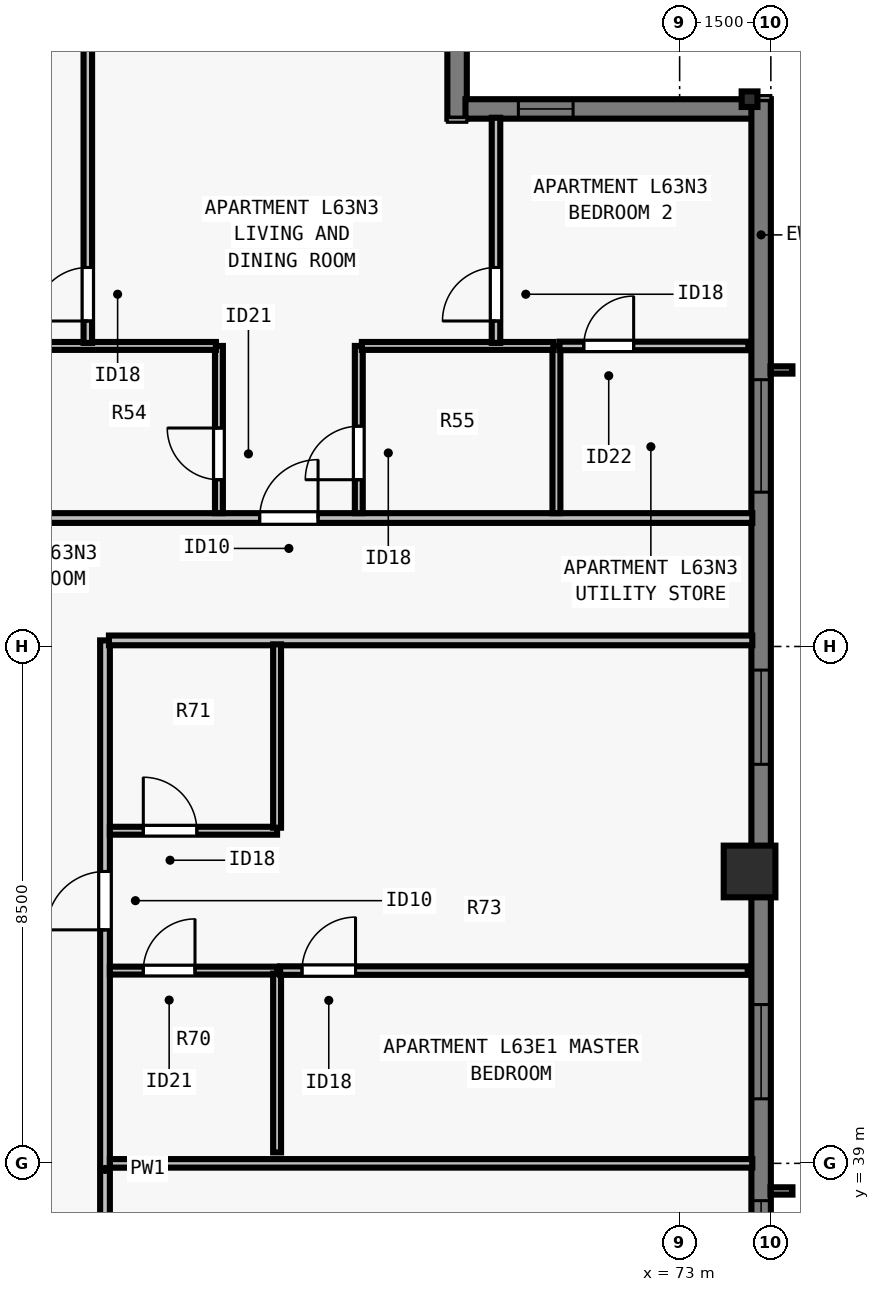
"""IFC4 building model, lengths in metres.
Left out: names, types, materials, properties, quantities, classifications, styles, units other than length and angle.
Written with IfcOpenShell. Run it as: python <this file> out.ifc"""

import sys

from ifc_helpers import new_model, si_unit, direction, frame, frame_2d, origin, origin_2d, place, context, subcontext, project, spatial, rectangle, i_section, extrude, element, fill, save


model = new_model("IFC4")
c1 = context("Model", 3, precision=1e-05, world=origin(), true_north=direction((0.0, 1.0)))
c2 = subcontext(c1, "Body", "Model", "MODEL_VIEW")
j1 = project(units=[si_unit("LENGTHUNIT", "METRE"), si_unit("PLANEANGLEUNIT", "RADIAN")], contexts=[c1])
p1 = place(None, origin())
s1 = spatial("IfcSite", under=j1, at=p1, CompositionType="ELEMENT")
p2 = place(p1, origin())
s2 = spatial("IfcBuilding", under=s1, at=p2, CompositionType="ELEMENT")
p3 = place(p2, frame((0.0, 0.0, 230.5)))
s3 = spatial("IfcBuildingStorey", under=s2, at=p3, CompositionType="ELEMENT", Elevation=230.5)
p4 = place(p3, frame((74.15, 43.8, 0.0), z_axis=(0.0, 0.0, 1.0), x_axis=(0.0, 1.0, 0.0)))
e1 = element("IfcColumn", 1, at=p4, inside=s3, PredefinedType="COLUMN", context=c2, shape_type="SweptSolid", body=[
    extrude(rectangle(XDim=0.85, YDim=0.85, at=origin_2d()), origin(), (0.0, 0.0, 1.0), 3.5),
])
p5 = place(p3, frame((74.15, 56.5, 0.0), z_axis=(0.0, 0.0, 1.0), x_axis=(0.0, 1.0, 0.0)))
e2 = element("IfcColumn", 2, at=p5, inside=s3, PredefinedType="COLUMN", context=c2, shape_type="SweptSolid", body=[
    extrude(i_section(OverallWidth=0.256, OverallDepth=0.26, WebThickness=0.01, FlangeThickness=0.017, FilletRadius=0.013, at=origin_2d()), origin(), (0.0, 0.0, 1.0), 3.5),
])
p6 = place(p3, frame((69.34, 61.5, 0.0), z_axis=(0.0, 0.0, 1.0), x_axis=(0.0, -1.0, 0.0)))
e3 = element("IfcWall", 3, at=p6, inside=s3, PredefinedType="SOLIDWALL", context=c2, shape_type="SweptSolid", body=[
    extrude(rectangle(XDim=5.32, YDim=0.32, at=frame_2d((2.66, 0.0))), origin(), (0.0, 0.0, 1.0), 3.29),
])
p7 = place(p3, frame((69.478, 56.34, 0.0), z_axis=(0.0, 0.0, 1.0), x_axis=(1.0, 0.0, 0.0)))
e4 = element("IfcWall", 4, at=p7, inside=s3, PredefinedType="SOLIDWALL", context=c2, shape_type="SweptSolid", body=[
    extrude(rectangle(XDim=4.724, YDim=0.32, at=frame_2d((2.362, 0.0))), origin(), (0.0, 0.0, 1.0), 3.29),
])
p8 = place(p7, frame((0.87, 0.0, 0.8)))
e5 = element("IfcOpeningElement", 5, at=p8, cuts=e4, PredefinedType="OPENING", context=c2, shape_type="SweptSolid", body=[
    extrude(rectangle(XDim=0.9, YDim=1.678, at=frame_2d((0.45, 0.839))), frame((0.0, 0.17, 0.0), z_axis=(0.0, -1.0, 0.0), x_axis=(1.0, 0.0, 0.0)), (0.0, 0.0, 1.0), 0.34),
])
p9 = place(p3, frame((74.34, 56.5, 0.0), z_axis=(0.0, 0.0, 1.0), x_axis=(0.0, -1.0, 0.0)))
e6 = element("IfcWall", 6, at=p9, inside=s3, PredefinedType="SOLIDWALL", context=c2, shape_type="SweptSolid", body=[
    extrude(rectangle(XDim=34.702, YDim=0.32, at=frame_2d((17.351, 0.0))), origin(), (0.0, 0.0, 1.0), 3.29),
])
p10 = place(p9, frame((4.613, 0.0, 0.8)))
e7 = element("IfcOpeningElement", 7, at=p10, cuts=e6, PredefinedType="OPENING", context=c2, shape_type="SweptSolid", body=[
    extrude(rectangle(XDim=1.85, YDim=1.678, at=frame_2d((0.925, 0.839))), frame((0.0, 0.17, 0.0), z_axis=(0.0, -1.0, 0.0), x_axis=(1.0, 0.0, 0.0)), (0.0, 0.0, 1.0), 0.34),
])
p11 = place(p9, frame((9.388, 0.0, 0.8)))
e8 = element("IfcOpeningElement", 8, at=p11, cuts=e6, PredefinedType="OPENING", context=c2, shape_type="SweptSolid", body=[
    extrude(rectangle(XDim=1.55, YDim=1.678, at=frame_2d((0.775, 0.839))), frame((0.0, 0.17, 0.0), z_axis=(0.0, -1.0, 0.0), x_axis=(1.0, 0.0, 0.0)), (0.0, 0.0, 1.0), 0.34),
])
p12 = place(p9, frame((14.888, 0.0, 0.8)))
e9 = element("IfcOpeningElement", 9, at=p12, cuts=e6, PredefinedType="OPENING", context=c2, shape_type="SweptSolid", body=[
    extrude(rectangle(XDim=1.55, YDim=1.678, at=frame_2d((0.775, 0.839))), frame((0.0, 0.17, 0.0), z_axis=(0.0, -1.0, 0.0), x_axis=(1.0, 0.0, 0.0)), (0.0, 0.0, 1.0), 0.34),
])
p13 = place(p9, frame((18.114, 0.0, 0.8)))
e10 = element("IfcOpeningElement", 10, at=p13, cuts=e6, PredefinedType="OPENING", context=c2, shape_type="SweptSolid", body=[
    extrude(rectangle(XDim=1.85, YDim=1.678, at=frame_2d((0.925, 0.839))), frame((0.0, 0.17, 0.0), z_axis=(0.0, -1.0, 0.0), x_axis=(1.0, 0.0, 0.0)), (0.0, 0.0, 1.0), 0.34),
])
p14 = place(p9, frame((23.614, 0.0, 0.8)))
e11 = element("IfcOpeningElement", 11, at=p14, cuts=e6, PredefinedType="OPENING", context=c2, shape_type="SweptSolid", body=[
    extrude(rectangle(XDim=1.85, YDim=1.678, at=frame_2d((0.925, 0.839))), frame((0.0, 0.17, 0.0), z_axis=(0.0, -1.0, 0.0), x_axis=(1.0, 0.0, 0.0)), (0.0, 0.0, 1.0), 0.34),
])
p15 = place(p9, frame((28.839, 0.0, 0.8)))
e12 = element("IfcOpeningElement", 12, at=p15, cuts=e6, PredefinedType="OPENING", context=c2, shape_type="SweptSolid", body=[
    extrude(rectangle(XDim=1.55, YDim=1.678, at=frame_2d((0.775, 0.839))), frame((0.0, 0.17, 0.0), z_axis=(0.0, -1.0, 0.0), x_axis=(1.0, 0.0, 0.0)), (0.0, 0.0, 1.0), 0.34),
])
p16 = place(p9, frame((31.35, 0.0, 0.8)))
e13 = element("IfcOpeningElement", 13, at=p16, cuts=e6, PredefinedType="OPENING", context=c2, shape_type="SweptSolid", body=[
    extrude(rectangle(XDim=0.9, YDim=1.678, at=frame_2d((0.45, 0.839))), frame((0.0, 0.17, 0.0), z_axis=(0.0, -1.0, 0.0), x_axis=(1.0, 0.0, 0.0)), (0.0, 0.0, 1.0), 0.34),
])
p17 = place(p3, frame((29.77, 49.613, 0.0), z_axis=(0.0, 0.0, 1.0), x_axis=(1.0, 0.0, 0.0)))
e14 = element("IfcWall", 14, at=p17, inside=s3, PredefinedType="PARTITIONING", context=c2, shape_type="SweptSolid", body=[
    extrude(rectangle(XDim=44.425, YDim=0.16, at=frame_2d((22.212, 0.0))), origin(), (0.0, 0.0, 1.0), 2.958),
])
p18 = place(p17, frame((7.241, 0.0, 0.0)))
e15 = element("IfcOpeningElement", 15, at=p18, cuts=e14, PredefinedType="OPENING", context=c2, shape_type="SweptSolid", body=[
    extrude(rectangle(XDim=0.96, YDim=2.18, at=frame_2d((0.48, 1.09))), frame((0.0, 0.09, 0.0), z_axis=(0.0, -1.0, 0.0), x_axis=(1.0, 0.0, 0.0)), (0.0, 0.0, 1.0), 0.18),
])
p19 = place(p17, frame((21.815, 0.0, 0.0)))
e16 = element("IfcOpeningElement", 16, at=p19, cuts=e14, PredefinedType="OPENING", context=c2, shape_type="SweptSolid", body=[
    extrude(rectangle(XDim=0.96, YDim=2.18, at=frame_2d((0.48, 1.09))), frame((0.0, 0.09, 0.0), z_axis=(0.0, -1.0, 0.0), x_axis=(1.0, 0.0, 0.0)), (0.0, 0.0, 1.0), 0.18),
])
p20 = place(p17, frame((36.324, 0.0, 0.0)))
e17 = element("IfcOpeningElement", 17, at=p20, cuts=e14, PredefinedType="OPENING", context=c2, shape_type="SweptSolid", body=[
    extrude(rectangle(XDim=0.96, YDim=2.18, at=frame_2d((0.48, 1.09))), frame((0.0, 0.09, 0.0), z_axis=(0.0, -1.0, 0.0), x_axis=(1.0, 0.0, 0.0)), (0.0, 0.0, 1.0), 0.18),
])
p21 = place(p3, frame((63.55, 30.4, 0.0), z_axis=(0.0, 0.0, 1.0), x_axis=(0.0, 1.0, 0.0)))
e18 = element("IfcWall", 18, at=p21, inside=s3, PredefinedType="PARTITIONING", context=c2, shape_type="SweptSolid", body=[
    extrude(rectangle(XDim=17.2, YDim=0.16, at=frame_2d((8.6, 0.0))), origin(), (0.0, 0.0, 1.0), 3.29),
])
p22 = place(p21, frame((3.6, 0.0, 0.0)))
e19 = element("IfcOpeningElement", 19, at=p22, cuts=e18, PredefinedType="OPENING", context=c2, shape_type="SweptSolid", body=[
    extrude(rectangle(XDim=0.96, YDim=2.12, at=frame_2d((0.48, 1.06))), frame((0.0, 0.09, 0.0), z_axis=(0.0, -1.0, 0.0), x_axis=(1.0, 0.0, 0.0)), (0.0, 0.0, 1.0), 0.18),
])
p23 = place(p21, frame((12.44, 0.0, 0.0)))
e20 = element("IfcOpeningElement", 20, at=p23, cuts=e18, PredefinedType="OPENING", context=c2, shape_type="SweptSolid", body=[
    extrude(rectangle(XDim=0.96, YDim=2.18, at=frame_2d((0.48, 1.09))), frame((0.0, 0.09, 0.0), z_axis=(0.0, -1.0, 0.0), x_axis=(1.0, 0.0, 0.0)), (0.0, 0.0, 1.0), 0.18),
])
p24 = place(p3, frame((63.615, 47.6, 0.0), z_axis=(0.0, 0.0, 1.0), x_axis=(1.0, 0.0, 0.0)))
e21 = element("IfcWall", 21, at=p24, inside=s3, PredefinedType="PARTITIONING", context=c2, shape_type="SweptSolid", body=[
    extrude(rectangle(XDim=10.58, YDim=0.16, at=frame_2d((5.29, 0.0))), origin(), (0.0, 0.0, 1.0), 3.29),
])
p25 = place(p3, frame((65.424, 49.692, 0.0), z_axis=(0.0, 0.0, 1.0), x_axis=(0.0, 1.0, 0.0)))
e22 = element("IfcWall", 22, at=p25, inside=s3, PredefinedType="PLUMBINGWALL", context=c2, shape_type="SweptSolid", body=[
    extrude(rectangle(XDim=2.75, YDim=0.13, at=frame_2d((1.375, 0.0))), origin(), (0.0, 0.0, 1.0), 3.29),
])
p26 = place(p25, frame((0.55, 0.0, 0.0)))
e23 = element("IfcOpeningElement", 23, at=p26, cuts=e22, PredefinedType="OPENING", context=c2, shape_type="SweptSolid", body=[
    extrude(rectangle(XDim=0.85, YDim=2.08, at=frame_2d((0.425, 1.04))), frame((0.0, 0.075, 0.0), z_axis=(0.0, -1.0, 0.0), x_axis=(1.0, 0.0, 0.0)), (0.0, 0.0, 1.0), 0.15),
])
p27 = place(p3, frame((62.524, 52.442, 0.0), z_axis=(0.0, 0.0, 1.0), x_axis=(1.0, 0.0, 0.0)))
e24 = element("IfcWall", 24, at=p27, inside=s3, PredefinedType="PLUMBINGWALL", context=c2, shape_type="SweptSolid", body=[
    extrude(rectangle(XDim=2.85, YDim=0.13, at=frame_2d((1.425, 0.0))), origin(), (0.0, 0.0, 1.0), 3.29),
])
p28 = place(p3, frame((70.974, 49.692, 0.0), z_axis=(0.0, 0.0, 1.0), x_axis=(0.0, 1.0, 0.0)))
e25 = element("IfcWall", 25, at=p28, inside=s3, PredefinedType="PLUMBINGWALL", context=c2, shape_type="SweptSolid", body=[
    extrude(rectangle(XDim=2.75, YDim=0.13, at=frame_2d((1.375, 0.0))), origin(), (0.0, 0.0, 1.0), 3.29),
])
p29 = place(p3, frame((67.724, 49.692, 0.0), z_axis=(0.0, 0.0, 1.0), x_axis=(0.0, 1.0, 0.0)))
e26 = element("IfcWall", 26, at=p29, inside=s3, PredefinedType="PLUMBINGWALL", context=c2, shape_type="SweptSolid", body=[
    extrude(rectangle(XDim=2.75, YDim=0.13, at=frame_2d((1.375, 0.0))), origin(), (0.0, 0.0, 1.0), 3.29),
])
p30 = place(p29, frame((0.55, 0.0, 0.0)))
e27 = element("IfcOpeningElement", 27, at=p30, cuts=e26, PredefinedType="OPENING", context=c2, shape_type="SweptSolid", body=[
    extrude(rectangle(XDim=0.88, YDim=2.1, at=frame_2d((0.44, 1.05))), frame((0.0, 0.075, 0.0), z_axis=(0.0, -1.0, 0.0), x_axis=(1.0, 0.0, 0.0)), (0.0, 0.0, 1.0), 0.15),
])
p31 = place(p3, frame((67.774, 52.442, 0.0), z_axis=(0.0, 0.0, 1.0), x_axis=(1.0, 0.0, 0.0)))
e28 = element("IfcWall", 28, at=p31, inside=s3, PredefinedType="PLUMBINGWALL", context=c2, shape_type="SweptSolid", body=[
    extrude(rectangle(XDim=3.15, YDim=0.13, at=frame_2d((1.575, 0.0))), origin(), (0.0, 0.0, 1.0), 2.958),
])
p32 = place(p3, frame((63.268, 52.492, 0.0), z_axis=(0.0, 0.0, 1.0), x_axis=(0.0, 1.0, 0.0)))
e29 = element("IfcWall", 29, at=p32, inside=s3, PredefinedType="PARTITIONING", context=c2, shape_type="SweptSolid", body=[
    extrude(rectangle(XDim=8.628, YDim=0.14, at=frame_2d((4.314, 0.0))), origin(), (0.0, 0.0, 1.0), 3.29),
])
p33 = place(p32, frame((0.36, 0.0, 0.0)))
e30 = element("IfcOpeningElement", 30, at=p33, cuts=e29, PredefinedType="OPENING", context=c2, shape_type="SweptSolid", body=[
    extrude(rectangle(XDim=0.88, YDim=2.1, at=frame_2d((0.44, 1.05))), frame((0.0, 0.08, 0.0), z_axis=(0.0, -1.0, 0.0), x_axis=(1.0, 0.0, 0.0)), (0.0, 0.0, 1.0), 0.16),
])
p34 = place(p3, frame((69.98, 52.492, 0.0), z_axis=(0.0, 0.0, 1.0), x_axis=(0.0, 1.0, 0.0)))
e31 = element("IfcWall", 31, at=p34, inside=s3, PredefinedType="PARTITIONING", context=c2, shape_type="SweptSolid", body=[
    extrude(rectangle(XDim=3.703, YDim=0.14, at=frame_2d((1.851, 0.0))), origin(), (0.0, 0.0, 1.0), 3.29),
])
p35 = place(p34, frame((0.36, 0.0, 0.0)))
e32 = element("IfcOpeningElement", 32, at=p35, cuts=e31, PredefinedType="OPENING", context=c2, shape_type="SweptSolid", body=[
    extrude(rectangle(XDim=0.88, YDim=2.1, at=frame_2d((0.44, 1.05))), frame((0.0, 0.08, 0.0), z_axis=(0.0, -1.0, 0.0), x_axis=(1.0, 0.0, 0.0)), (0.0, 0.0, 1.0), 0.16),
])
p36 = place(p3, frame((71.024, 52.442, 0.0), z_axis=(0.0, 0.0, 1.0), x_axis=(1.0, 0.0, 0.0)))
e33 = element("IfcWall", 33, at=p36, inside=s3, PredefinedType="PARTITIONING", context=c2, shape_type="SweptSolid", body=[
    extrude(rectangle(XDim=3.106, YDim=0.14, at=frame_2d((1.553, 0.0))), origin(), (0.0, 0.0, 1.0), 3.29),
])
p37 = place(p36, frame((0.4, 0.0, 0.0)))
e34 = element("IfcOpeningElement", 34, at=p37, cuts=e33, PredefinedType="OPENING", context=c2, shape_type="SweptSolid", body=[
    extrude(rectangle(XDim=0.82, YDim=2.1, at=frame_2d((0.41, 1.05))), frame((0.0, 0.08, 0.0), z_axis=(0.0, -1.0, 0.0), x_axis=(1.0, 0.0, 0.0)), (0.0, 0.0, 1.0), 0.16),
])
p38 = place(p3, frame((63.63, 39.0, 0.0), z_axis=(0.0, 0.0, 1.0), x_axis=(1.0, 0.0, 0.0)))
e35 = element("IfcWall", 35, at=p38, inside=s3, PredefinedType="PARTITIONING", context=c2, shape_type="SweptSolid", body=[
    extrude(rectangle(XDim=10.565, YDim=0.14, at=frame_2d((5.283, 0.0))), origin(), (0.0, 0.0, 1.0), 3.29),
])
p39 = place(p3, frame((63.63, 42.17, 0.0), z_axis=(0.0, 0.0, 1.0), x_axis=(1.0, 0.0, 0.0)))
e36 = element("IfcWall", 36, at=p39, inside=s3, PredefinedType="PLUMBINGWALL", context=c2, shape_type="SweptSolid", body=[
    extrude(rectangle(XDim=2.75, YDim=0.13, at=frame_2d((1.375, 0.0))), origin(), (0.0, 0.0, 1.0), 3.29),
])
p40 = place(p39, frame((0.55, 0.0, 0.0)))
e37 = element("IfcOpeningElement", 37, at=p40, cuts=e36, PredefinedType="OPENING", context=c2, shape_type="SweptSolid", body=[
    extrude(rectangle(XDim=0.85, YDim=2.08, at=frame_2d((0.425, 1.04))), frame((0.0, 0.075, 0.0), z_axis=(0.0, -1.0, 0.0), x_axis=(1.0, 0.0, 0.0)), (0.0, 0.0, 1.0), 0.15),
])
p41 = place(p3, frame((66.38, 39.18, 0.0), z_axis=(0.0, 0.0, 1.0), x_axis=(0.0, 1.0, 0.0)))
e38 = element("IfcWall", 38, at=p41, inside=s3, PredefinedType="PLUMBINGWALL", context=c2, shape_type="SweptSolid", body=[
    extrude(rectangle(XDim=2.94, YDim=0.13, at=frame_2d((1.47, 0.0))), origin(), (0.0, 0.0, 1.0), 3.29),
])
p42 = place(p3, frame((63.63, 44.47, 0.0), z_axis=(0.0, 0.0, 1.0), x_axis=(1.0, 0.0, 0.0)))
e39 = element("IfcWall", 39, at=p42, inside=s3, PredefinedType="PLUMBINGWALL", context=c2, shape_type="SweptSolid", body=[
    extrude(rectangle(XDim=2.75, YDim=0.13, at=frame_2d((1.375, 0.0))), origin(), (0.0, 0.0, 1.0), 3.29),
])
p43 = place(p42, frame((0.55, 0.0, 0.0)))
e40 = element("IfcOpeningElement", 40, at=p43, cuts=e39, PredefinedType="OPENING", context=c2, shape_type="SweptSolid", body=[
    extrude(rectangle(XDim=0.88, YDim=2.1, at=frame_2d((0.44, 1.05))), frame((0.0, 0.075, 0.0), z_axis=(0.0, -1.0, 0.0), x_axis=(1.0, 0.0, 0.0)), (0.0, 0.0, 1.0), 0.15),
])
p44 = place(p3, frame((66.38, 44.52, 0.0), z_axis=(0.0, 0.0, 1.0), x_axis=(0.0, 1.0, 0.0)))
e41 = element("IfcWall", 41, at=p44, inside=s3, PredefinedType="PLUMBINGWALL", context=c2, shape_type="SweptSolid", body=[
    extrude(rectangle(XDim=3.015, YDim=0.13, at=frame_2d((1.507, 0.0))), origin(), (0.0, 0.0, 1.0), 3.29),
])
p45 = place(p3, frame((66.43, 42.17, 0.0), z_axis=(0.0, 0.0, 1.0), x_axis=(1.0, 0.0, 0.0)))
e42 = element("IfcWall", 42, at=p45, inside=s3, PredefinedType="PARTITIONING", context=c2, shape_type="SweptSolid", body=[
    extrude(rectangle(XDim=7.69, YDim=0.14, at=frame_2d((3.845, 0.0))), origin(), (0.0, 0.0, 1.0), 3.29),
])
p46 = place(p45, frame((0.36, 0.0, 0.0)))
e43 = element("IfcOpeningElement", 43, at=p46, cuts=e42, PredefinedType="OPENING", context=c2, shape_type="SweptSolid", body=[
    extrude(rectangle(XDim=0.88, YDim=2.1, at=frame_2d((0.44, 1.05))), frame((0.0, 0.08, 0.0), z_axis=(0.0, -1.0, 0.0), x_axis=(1.0, 0.0, 0.0)), (0.0, 0.0, 1.0), 0.16),
])
p47 = place(p10, origin())
e44 = element("IfcWindow", 44, at=p47, inside=s3, PartitioningType="SINGLE_PANEL", PredefinedType="WINDOW", context=c2, shape_type="SweptSolid", body=[
    extrude(rectangle(XDim=1.85, YDim=1.678, at=frame_2d((0.925, 0.839))), frame((0.0, -0.05, 0.0), z_axis=(0.0, -1.0, 0.0), x_axis=(1.0, 0.0, 0.0)), (0.0, 0.0, 1.0), 0.06),
])
fill(e7, e44)
p48 = place(p11, origin())
e45 = element("IfcWindow", 45, at=p48, inside=s3, PartitioningType="SINGLE_PANEL", PredefinedType="WINDOW", context=c2, shape_type="SweptSolid", body=[
    extrude(rectangle(XDim=1.55, YDim=1.678, at=frame_2d((0.775, 0.839))), frame((0.0, -0.05, 0.0), z_axis=(0.0, -1.0, 0.0), x_axis=(1.0, 0.0, 0.0)), (0.0, 0.0, 1.0), 0.06),
])
fill(e8, e45)
p49 = place(p12, origin())
e46 = element("IfcWindow", 46, at=p49, inside=s3, PartitioningType="SINGLE_PANEL", PredefinedType="WINDOW", context=c2, shape_type="SweptSolid", body=[
    extrude(rectangle(XDim=1.55, YDim=1.678, at=frame_2d((0.775, 0.839))), frame((0.0, -0.05, 0.0), z_axis=(0.0, -1.0, 0.0), x_axis=(1.0, 0.0, 0.0)), (0.0, 0.0, 1.0), 0.06),
])
fill(e9, e46)
p50 = place(p13, origin())
e47 = element("IfcWindow", 47, at=p50, inside=s3, PartitioningType="SINGLE_PANEL", PredefinedType="WINDOW", context=c2, shape_type="SweptSolid", body=[
    extrude(rectangle(XDim=1.85, YDim=1.678, at=frame_2d((0.925, 0.839))), frame((0.0, -0.05, 0.0), z_axis=(0.0, -1.0, 0.0), x_axis=(1.0, 0.0, 0.0)), (0.0, 0.0, 1.0), 0.06),
])
fill(e10, e47)
p51 = place(p8, origin())
e48 = element("IfcWindow", 48, at=p51, inside=s3, PartitioningType="SINGLE_PANEL", PredefinedType="WINDOW", context=c2, shape_type="SweptSolid", body=[
    extrude(rectangle(XDim=0.9, YDim=1.678, at=frame_2d((0.45, 0.839))), frame((0.0, -0.04, 0.0), z_axis=(0.0, -1.0, 0.0), x_axis=(1.0, 0.0, 0.0)), (0.0, 0.0, 1.0), 0.06),
])
fill(e5, e48)
p52 = place(p26, origin())
e49 = element("IfcDoor", 49, at=p52, inside=s3, OperationType="SINGLE_SWING_RIGHT", PredefinedType="DOOR", context=c2, shape_type="SweptSolid", body=[
    extrude(rectangle(XDim=0.85, YDim=2.08, at=frame_2d((0.425, 1.04))), frame((0.0, 0.025, 0.0), z_axis=(0.0, -1.0, 0.0), x_axis=(1.0, 0.0, 0.0)), (0.0, 0.0, 1.0), 0.05),
])
fill(e23, e49)
p53 = place(p30, origin())
e50 = element("IfcDoor", 50, at=p53, inside=s3, OperationType="SINGLE_SWING_LEFT", PredefinedType="DOOR", context=c2, shape_type="SweptSolid", body=[
    extrude(rectangle(XDim=0.88, YDim=2.1, at=frame_2d((0.44, 1.05))), frame((0.0, 0.025, 0.0), z_axis=(0.0, -1.0, 0.0), x_axis=(1.0, 0.0, 0.0)), (0.0, 0.0, 1.0), 0.05),
])
fill(e27, e50)
p54 = place(p33, origin())
e51 = element("IfcDoor", 51, at=p54, inside=s3, OperationType="SINGLE_SWING_LEFT", PredefinedType="DOOR", context=c2, shape_type="SweptSolid", body=[
    extrude(rectangle(XDim=0.88, YDim=2.1, at=frame_2d((0.44, 1.05))), frame((0.0, 0.025, 0.0), z_axis=(0.0, -1.0, 0.0), x_axis=(1.0, 0.0, 0.0)), (0.0, 0.0, 1.0), 0.05),
])
fill(e30, e51)
p55 = place(p37, origin())
e52 = element("IfcDoor", 52, at=p55, inside=s3, OperationType="SINGLE_SWING_RIGHT", PredefinedType="DOOR", context=c2, shape_type="SweptSolid", body=[
    extrude(rectangle(XDim=0.82, YDim=2.1, at=frame_2d((0.41, 1.05))), frame((0.0, 0.025, 0.0), z_axis=(0.0, -1.0, 0.0), x_axis=(1.0, 0.0, 0.0)), (0.0, 0.0, 1.0), 0.05),
])
fill(e34, e52)
p56 = place(p35, origin())
e53 = element("IfcDoor", 53, at=p56, inside=s3, OperationType="SINGLE_SWING_LEFT", PredefinedType="DOOR", context=c2, shape_type="SweptSolid", body=[
    extrude(rectangle(XDim=0.88, YDim=2.1, at=frame_2d((0.44, 1.05))), frame((0.0, 0.025, 0.0), z_axis=(0.0, -1.0, 0.0), x_axis=(1.0, 0.0, 0.0)), (0.0, 0.0, 1.0), 0.05),
])
fill(e32, e53)
p57 = place(p20, origin())
e54 = element("IfcDoor", 54, at=p57, inside=s3, OperationType="SINGLE_SWING_RIGHT", PredefinedType="DOOR", context=c2, shape_type="SweptSolid", body=[
    extrude(rectangle(XDim=0.96, YDim=2.18, at=frame_2d((0.48, 1.09))), frame((0.0, 0.025, 0.0), z_axis=(0.0, -1.0, 0.0), x_axis=(1.0, 0.0, 0.0)), (0.0, 0.0, 1.0), 0.05),
])
fill(e17, e54)
p58 = place(p40, origin())
e55 = element("IfcDoor", 55, at=p58, inside=s3, OperationType="SINGLE_SWING_RIGHT", PredefinedType="DOOR", context=c2, shape_type="SweptSolid", body=[
    extrude(rectangle(XDim=0.85, YDim=2.08, at=frame_2d((0.425, 1.04))), frame((0.0, 0.025, 0.0), z_axis=(0.0, -1.0, 0.0), x_axis=(1.0, 0.0, 0.0)), (0.0, 0.0, 1.0), 0.05),
])
fill(e37, e55)
p59 = place(p43, origin())
e56 = element("IfcDoor", 56, at=p59, inside=s3, OperationType="SINGLE_SWING_LEFT", PredefinedType="DOOR", context=c2, shape_type="SweptSolid", body=[
    extrude(rectangle(XDim=0.88, YDim=2.1, at=frame_2d((0.44, 1.05))), frame((0.0, 0.025, 0.0), z_axis=(0.0, -1.0, 0.0), x_axis=(1.0, 0.0, 0.0)), (0.0, 0.0, 1.0), 0.05),
])
fill(e40, e56)
p60 = place(p46, origin())
e57 = element("IfcDoor", 57, at=p60, inside=s3, OperationType="SINGLE_SWING_RIGHT", PredefinedType="DOOR", context=c2, shape_type="SweptSolid", body=[
    extrude(rectangle(XDim=0.88, YDim=2.1, at=frame_2d((0.44, 1.05))), frame((0.0, 0.025, 0.0), z_axis=(0.0, -1.0, 0.0), x_axis=(1.0, 0.0, 0.0)), (0.0, 0.0, 1.0), 0.05),
])
fill(e43, e57)
p61 = place(p23, origin())
e58 = element("IfcDoor", 58, at=p61, inside=s3, OperationType="SINGLE_SWING_LEFT", PredefinedType="DOOR", context=c2, shape_type="SweptSolid", body=[
    extrude(rectangle(XDim=0.96, YDim=2.18, at=frame_2d((0.48, 1.09))), frame((0.0, 0.025, 0.0), z_axis=(0.0, -1.0, 0.0), x_axis=(1.0, 0.0, 0.0)), (0.0, 0.0, 1.0), 0.05),
])
fill(e20, e58)
save(model, sys.argv[1])
